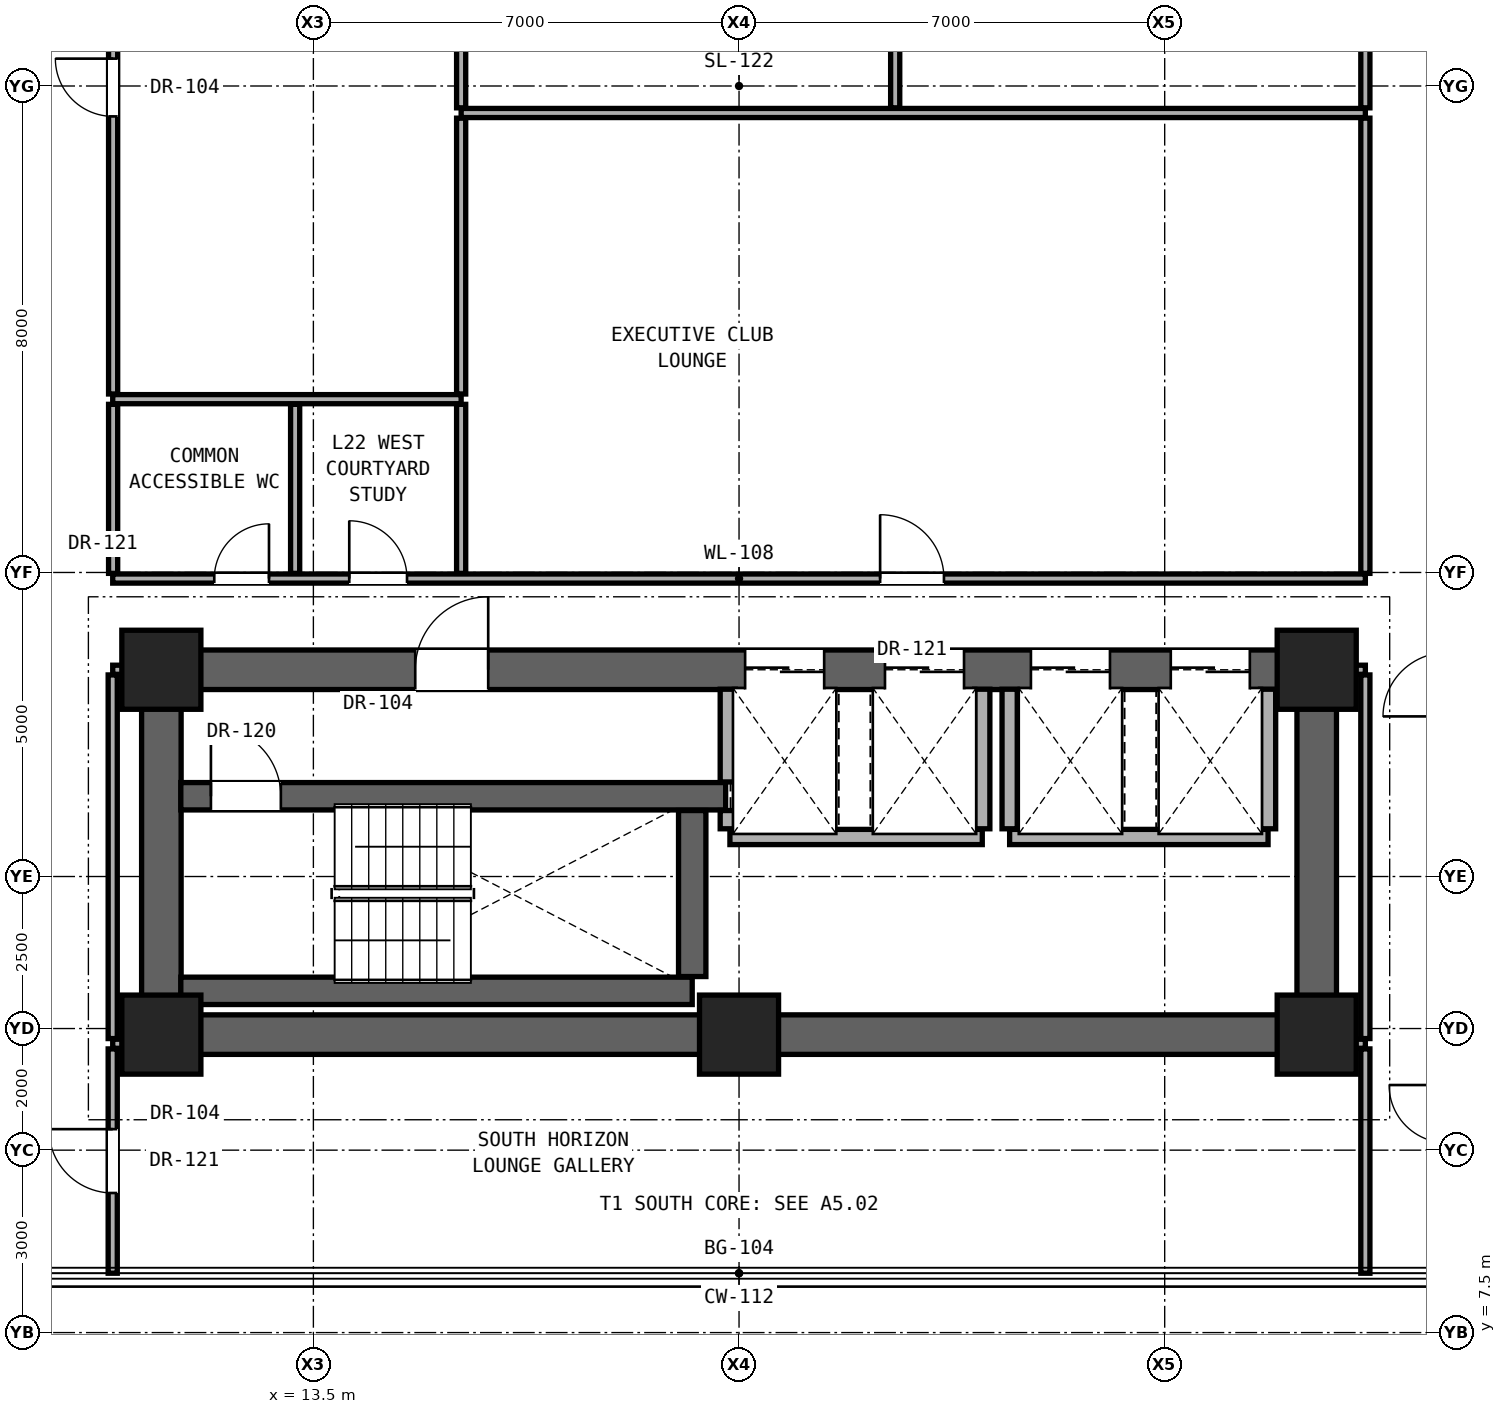
"""IFC4 building model, lengths in metres.
Left out: names, types, materials, properties, quantities, classifications, styles, units other than length and angle.
Written with IfcOpenShell. Run it as: python <this file> out.ifc"""

import sys

from ifc_helpers import new_model, si_unit, direction, frame, frame_2d, origin, origin_2d, place, context, subcontext, project, spatial, rectangle, extrude, element, fill, save


model = new_model("IFC4")
c1 = context("Model", 3, precision=1e-05, world=origin(), true_north=direction((0.0, 1.0)))
c2 = subcontext(c1, "Body", "Model", "MODEL_VIEW")
j1 = project(units=[si_unit("LENGTHUNIT", "METRE"), si_unit("PLANEANGLEUNIT", "RADIAN")], contexts=[c1])
p1 = place(None, origin())
s1 = spatial("IfcSite", under=j1, at=p1, CompositionType="ELEMENT")
p2 = place(p1, origin())
s2 = spatial("IfcBuilding", under=s1, at=p2, CompositionType="ELEMENT")
p3 = place(p2, frame((0.0, 0.0, 78.5)))
s3 = spatial("IfcBuildingStorey", under=s2, at=p3, CompositionType="ELEMENT", Elevation=78.5)
for number, where, z_axis, x_axis in (
    (1, (11.0, 12.4, 0.0), (0.0, 0.0, 1.0), (1.0, 0.0, 0.0)),
    (2, (20.5, 12.4, 0.0), (0.0, 0.0, 1.0), (1.0, 0.0, 0.0)),
    (3, (30.0, 12.4, 0.0), (0.0, 0.0, 1.0), (1.0, 0.0, 0.0)),
    (4, (11.0, 18.4, 0.0), (0.0, 0.0, 1.0), (1.0, 0.0, 0.0)),
    (5, (30.0, 18.4, 0.0), (0.0, 0.0, 1.0), (1.0, 0.0, 0.0)),
):
    element("IfcColumn", number, at=place(p3, frame(where, z_axis=z_axis, x_axis=x_axis)), inside=s3, PredefinedType="COLUMN", context=c2, shape_type="SweptSolid", body=[
        extrude(rectangle(XDim=1.3, YDim=1.3, at=origin_2d()), origin(), (0.0, 0.0, 1.0), 3.3),
    ])
p4 = place(p3, frame((11.0, 12.4, 0.0), z_axis=(0.0, 0.0, 1.0), x_axis=(1.0, 0.0, 0.0)))
e6 = element("IfcWall", 6, at=p4, inside=s3, PredefinedType="SHEAR", context=c2, shape_type="SweptSolid", body=[
    extrude(rectangle(XDim=19.0, YDim=0.65, at=frame_2d((9.5, 0.0))), origin(), (0.0, 0.0, 1.0), 2.94),
])
for number, where, z_axis, x_axis in (
    (7, (11.0, 12.4, 0.0), (0.0, 0.0, 1.0), (0.0, 1.0, 0.0)),
    (8, (30.0, 12.4, 0.0), (0.0, 0.0, 1.0), (0.0, 1.0, 0.0)),
):
    element("IfcWall", number, at=place(p3, frame(where, z_axis=z_axis, x_axis=x_axis)), inside=s3, PredefinedType="SHEAR", context=c2, shape_type="SweptSolid", body=[
        extrude(rectangle(XDim=6.0, YDim=0.65, at=frame_2d((3.0, 0.0))), origin(), (0.0, 0.0, 1.0), 2.94),
    ])
p5 = place(p3, frame((11.0, 18.4, 0.0), z_axis=(0.0, 0.0, 1.0), x_axis=(1.0, 0.0, 0.0)))
e9 = element("IfcWall", 9, at=p5, inside=s3, PredefinedType="SHEAR", context=c2, shape_type="SweptSolid", body=[
    extrude(rectangle(XDim=19.0, YDim=0.65, at=frame_2d((9.5, 0.0))), origin(), (0.0, 0.0, 1.0), 2.94),
])
p6 = place(p5, frame((4.175, 0.0, 0.0)))
e10 = element("IfcOpeningElement", 10, at=p6, cuts=e9, PredefinedType="OPENING", context=c2, shape_type="SweptSolid", body=[
    extrude(rectangle(XDim=1.2, YDim=2.25, at=frame_2d((0.6, 1.125))), frame((0.0, 0.335, 0.0), z_axis=(0.0, -1.0, 0.0), x_axis=(1.0, 0.0, 0.0)), (0.0, 0.0, 1.0), 0.67),
])
p7 = place(p5, frame((9.6, 0.0, 0.0)))
e11 = element("IfcOpeningElement", 11, at=p7, cuts=e9, PredefinedType="OPENING", context=c2, shape_type="SweptSolid", body=[
    extrude(rectangle(XDim=1.3, YDim=2.3, at=frame_2d((0.65, 1.15))), frame((0.0, 0.335, 0.0), z_axis=(0.0, -1.0, 0.0), x_axis=(1.0, 0.0, 0.0)), (0.0, 0.0, 1.0), 0.67),
])
p8 = place(p5, frame((11.9, 0.0, 0.0)))
e12 = element("IfcOpeningElement", 12, at=p8, cuts=e9, PredefinedType="OPENING", context=c2, shape_type="SweptSolid", body=[
    extrude(rectangle(XDim=1.3, YDim=2.3, at=frame_2d((0.65, 1.15))), frame((0.0, 0.335, 0.0), z_axis=(0.0, -1.0, 0.0), x_axis=(1.0, 0.0, 0.0)), (0.0, 0.0, 1.0), 0.67),
])
p9 = place(p5, frame((14.3, 0.0, 0.0)))
e13 = element("IfcOpeningElement", 13, at=p9, cuts=e9, PredefinedType="OPENING", context=c2, shape_type="SweptSolid", body=[
    extrude(rectangle(XDim=1.3, YDim=2.3, at=frame_2d((0.65, 1.15))), frame((0.0, 0.335, 0.0), z_axis=(0.0, -1.0, 0.0), x_axis=(1.0, 0.0, 0.0)), (0.0, 0.0, 1.0), 0.67),
])
p10 = place(p5, frame((16.6, 0.0, 0.0)))
e14 = element("IfcOpeningElement", 14, at=p10, cuts=e9, PredefinedType="OPENING", context=c2, shape_type="SweptSolid", body=[
    extrude(rectangle(XDim=1.3, YDim=2.3, at=frame_2d((0.65, 1.15))), frame((0.0, 0.335, 0.0), z_axis=(0.0, -1.0, 0.0), x_axis=(1.0, 0.0, 0.0)), (0.0, 0.0, 1.0), 0.67),
])
for number, where, z_axis, x_axis in (
    (15, (10.2, 12.25, 0.0), (0.0, 0.0, 1.0), (1.0, 0.0, 0.0)),
    (16, (30.32, 12.25, 0.0), (0.0, 0.0, 1.0), (1.0, 0.0, 0.0)),
):
    element("IfcWall", number, at=place(p3, frame(where, z_axis=z_axis, x_axis=x_axis)), inside=s3, PredefinedType="PARTITIONING", context=c2, shape_type="SweptSolid", body=[
        extrude(rectangle(XDim=0.48, YDim=0.15, at=frame_2d((0.24, 0.0))), origin(), (0.0, 0.0, 1.0), 2.94),
    ])
p11 = place(p3, frame((11.32, 13.12, 0.0), z_axis=(0.0, 0.0, 1.0), x_axis=(1.0, 0.0, 0.0)))
e17 = element("IfcWall", 17, at=p11, inside=s3, PredefinedType="SHEAR", context=c2, shape_type="SweptSolid", body=[
    extrude(rectangle(XDim=8.41, YDim=0.45, at=frame_2d((4.205, 0.0))), origin(), (0.0, 0.0, 1.0), 2.94),
])
p12 = place(p3, frame((20.35, 15.65, 0.0), z_axis=(0.0, 0.0, 1.0), x_axis=(1.0, 0.0, 0.0)))
e18 = element("IfcWall", 18, at=p12, inside=s3, PredefinedType="SOLIDWALL", context=c2, shape_type="SweptSolid", body=[
    extrude(rectangle(XDim=4.15, YDim=0.25, at=frame_2d((2.075, 0.0))), origin(), (0.0, 0.0, 1.0), 2.94),
])
p13 = place(p3, frame((24.95, 15.65, 0.0), z_axis=(0.0, 0.0, 1.0), x_axis=(1.0, 0.0, 0.0)))
e19 = element("IfcWall", 19, at=p13, inside=s3, PredefinedType="SOLIDWALL", context=c2, shape_type="SweptSolid", body=[
    extrude(rectangle(XDim=4.25, YDim=0.25, at=frame_2d((2.125, 0.0))), origin(), (0.0, 0.0, 1.0), 2.94),
])
p14 = place(p3, frame((11.32, 16.32, 0.0), z_axis=(0.0, 0.0, 1.0), x_axis=(1.0, 0.0, 0.0)))
e20 = element("IfcWall", 20, at=p14, inside=s3, PredefinedType="SHEAR", context=c2, shape_type="SweptSolid", body=[
    extrude(rectangle(XDim=8.96, YDim=0.45, at=frame_2d((4.48, 0.0))), origin(), (0.0, 0.0, 1.0), 2.94),
])
p15 = place(p14, frame((0.495, 0.0, 0.0)))
e21 = element("IfcOpeningElement", 21, at=p15, cuts=e20, PredefinedType="OPENING", context=c2, shape_type="SweptSolid", body=[
    extrude(rectangle(XDim=1.15, YDim=2.2, at=frame_2d((0.575, 1.1))), frame((0.0, 0.235, 0.0), z_axis=(0.0, -1.0, 0.0), x_axis=(1.0, 0.0, 0.0)), (0.0, 0.0, 1.0), 0.47),
])
for number, where, z_axis, x_axis in (
    (22, (10.2, 18.4, 0.0), (0.0, 0.0, 1.0), (1.0, 0.0, 0.0)),
    (23, (30.32, 18.4, 0.0), (0.0, 0.0, 1.0), (1.0, 0.0, 0.0)),
):
    element("IfcWall", number, at=place(p3, frame(where, z_axis=z_axis, x_axis=x_axis)), inside=s3, PredefinedType="PARTITIONING", context=c2, shape_type="SweptSolid", body=[
        extrude(rectangle(XDim=0.48, YDim=0.15, at=frame_2d((0.24, 0.0))), origin(), (0.0, 0.0, 1.0), 2.316),
    ])
p16 = place(p3, frame((10.2, 19.9, 0.0), z_axis=(0.0, 0.0, 1.0), x_axis=(1.0, 0.0, 0.0)))
e24 = element("IfcWall", 24, at=p16, inside=s3, PredefinedType="PARTITIONING", context=c2, shape_type="SweptSolid", body=[
    extrude(rectangle(XDim=20.6, YDim=0.15, at=frame_2d((10.3, 0.0))), origin(), (0.0, 0.0, 1.0), 2.316),
])
p17 = place(p16, frame((1.67, 0.0, 0.0)))
e25 = element("IfcOpeningElement", 25, at=p17, cuts=e24, PredefinedType="OPENING", context=c2, shape_type="SweptSolid", body=[
    extrude(rectangle(XDim=0.9, YDim=2.1, at=frame_2d((0.45, 1.05))), frame((0.0, 0.085, 0.0), z_axis=(0.0, -1.0, 0.0), x_axis=(1.0, 0.0, 0.0)), (0.0, 0.0, 1.0), 0.17),
])
p18 = place(p16, frame((3.89, 0.0, 0.0)))
e26 = element("IfcOpeningElement", 26, at=p18, cuts=e24, PredefinedType="OPENING", context=c2, shape_type="SweptSolid", body=[
    extrude(rectangle(XDim=0.95, YDim=2.15, at=frame_2d((0.475, 1.075))), frame((0.0, 0.085, 0.0), z_axis=(0.0, -1.0, 0.0), x_axis=(1.0, 0.0, 0.0)), (0.0, 0.0, 1.0), 0.17),
])
p19 = place(p16, frame((12.62, 0.0, 0.0)))
e27 = element("IfcOpeningElement", 27, at=p19, cuts=e24, PredefinedType="OPENING", context=c2, shape_type="SweptSolid", body=[
    extrude(rectangle(XDim=1.05, YDim=2.2, at=frame_2d((0.525, 1.1))), frame((0.0, 0.085, 0.0), z_axis=(0.0, -1.0, 0.0), x_axis=(1.0, 0.0, 0.0)), (0.0, 0.0, 1.0), 0.17),
])
p20 = place(p3, frame((10.2, 22.85, 0.0), z_axis=(0.0, 0.0, 1.0), x_axis=(1.0, 0.0, 0.0)))
e28 = element("IfcWall", 28, at=p20, inside=s3, PredefinedType="PARTITIONING", context=c2, shape_type="SweptSolid", body=[
    extrude(rectangle(XDim=5.73, YDim=0.15, at=frame_2d((2.865, 0.0))), origin(), (0.0, 0.0, 1.0), 2.316),
])
p21 = place(p3, frame((15.93, 27.556, 0.0), z_axis=(0.0, 0.0, 1.0), x_axis=(1.0, 0.0, 0.0)))
e29 = element("IfcWall", 29, at=p21, inside=s3, PredefinedType="PARTITIONING", context=c2, shape_type="SweptSolid", body=[
    extrude(rectangle(XDim=14.87, YDim=0.15, at=frame_2d((7.435, 0.0))), origin(), (0.0, 0.0, 1.0), 2.316),
])
p22 = place(p3, frame((10.2, 8.476, 0.0), z_axis=(0.0, 0.0, 1.0), x_axis=(0.0, 1.0, 0.0)))
e30 = element("IfcWall", 30, at=p22, inside=s3, PredefinedType="PARTITIONING", context=c2, shape_type="SweptSolid", body=[
    extrude(rectangle(XDim=3.689, YDim=0.15, at=frame_2d((1.844, 0.0))), origin(), (0.0, 0.0, 1.0), 2.94),
])
p23 = place(p22, frame((1.32, 0.0, 0.0)))
e31 = element("IfcOpeningElement", 31, at=p23, cuts=e30, PredefinedType="OPENING", context=c2, shape_type="SweptSolid", body=[
    extrude(rectangle(XDim=1.05, YDim=2.2, at=frame_2d((0.525, 1.1))), frame((0.0, 0.085, 0.0), z_axis=(0.0, -1.0, 0.0), x_axis=(1.0, 0.0, 0.0)), (0.0, 0.0, 1.0), 0.17),
])
p24 = place(p3, frame((10.2, 12.335, 0.0), z_axis=(0.0, 0.0, 1.0), x_axis=(0.0, 1.0, 0.0)))
e32 = element("IfcWall", 32, at=p24, inside=s3, PredefinedType="PARTITIONING", context=c2, shape_type="SweptSolid", body=[
    extrude(rectangle(XDim=5.98, YDim=0.15, at=frame_2d((2.99, 0.0))), origin(), (0.0, 0.0, 1.0), 2.316),
])
p25 = place(p3, frame((10.207, 19.985, 0.0), z_axis=(0.0, 0.0, 1.0), x_axis=(0.0, 1.0, 0.0)))
e33 = element("IfcWall", 33, at=p25, inside=s3, PredefinedType="PARTITIONING", context=c2, shape_type="SweptSolid", body=[
    extrude(rectangle(XDim=2.78, YDim=0.15, at=frame_2d((1.39, 0.0))), origin(), (0.0, 0.0, 1.0), 2.94),
])
p26 = place(p3, frame((10.207, 22.935, 0.0), z_axis=(0.0, 0.0, 1.0), x_axis=(0.0, 1.0, 0.0)))
e34 = element("IfcWall", 34, at=p26, inside=s3, PredefinedType="PARTITIONING", context=c2, shape_type="SweptSolid", body=[
    extrude(rectangle(XDim=10.08, YDim=0.15, at=frame_2d((5.04, 0.0))), origin(), (0.0, 0.0, 1.0), 2.316),
])
p27 = place(p26, frame((4.565, 0.0, 0.0)))
e35 = element("IfcOpeningElement", 35, at=p27, cuts=e34, PredefinedType="OPENING", context=c2, shape_type="SweptSolid", body=[
    extrude(rectangle(XDim=0.95, YDim=2.15, at=frame_2d((0.475, 1.075))), frame((0.0, 0.085, 0.0), z_axis=(0.0, -1.0, 0.0), x_axis=(1.0, 0.0, 0.0)), (0.0, 0.0, 1.0), 0.17),
])
p28 = place(p3, frame((13.2, 19.985, 0.0), z_axis=(0.0, 0.0, 1.0), x_axis=(0.0, 1.0, 0.0)))
e36 = element("IfcWall", 36, at=p28, inside=s3, PredefinedType="PARTITIONING", context=c2, shape_type="SweptSolid", body=[
    extrude(rectangle(XDim=2.78, YDim=0.15, at=frame_2d((1.39, 0.0))), origin(), (0.0, 0.0, 1.0), 2.94),
])
p29 = place(p3, frame((15.93, 19.985, 0.0), z_axis=(0.0, 0.0, 1.0), x_axis=(0.0, 1.0, 0.0)))
e37 = element("IfcWall", 37, at=p29, inside=s3, PredefinedType="PARTITIONING", context=c2, shape_type="SweptSolid", body=[
    extrude(rectangle(XDim=2.78, YDim=0.15, at=frame_2d((1.39, 0.0))), origin(), (0.0, 0.0, 1.0), 2.469),
])
p30 = place(p3, frame((15.93, 22.935, 0.0), z_axis=(0.0, 0.0, 1.0), x_axis=(0.0, 1.0, 0.0)))
e38 = element("IfcWall", 38, at=p30, inside=s3, PredefinedType="PARTITIONING", context=c2, shape_type="SweptSolid", body=[
    extrude(rectangle(XDim=4.536, YDim=0.15, at=frame_2d((2.268, 0.0))), origin(), (0.0, 0.0, 1.0), 2.316),
])
p31 = place(p3, frame((15.93, 27.641, 0.0), z_axis=(0.0, 0.0, 1.0), x_axis=(0.0, 1.0, 0.0)))
e39 = element("IfcWall", 39, at=p31, inside=s3, PredefinedType="PARTITIONING", context=c2, shape_type="SweptSolid", body=[
    extrude(rectangle(XDim=5.374, YDim=0.15, at=frame_2d((2.687, 0.0))), origin(), (0.0, 0.0, 1.0), 2.316),
])
p32 = place(p3, frame((19.73, 13.355, 0.0), z_axis=(0.0, 0.0, 1.0), x_axis=(0.0, 1.0, 0.0)))
e40 = element("IfcWall", 40, at=p32, inside=s3, PredefinedType="SHEAR", context=c2, shape_type="SweptSolid", body=[
    extrude(rectangle(XDim=2.73, YDim=0.45, at=frame_2d((1.365, 0.0))), origin(), (0.0, 0.0, 1.0), 2.94),
])
p33 = place(p3, frame((20.315, 15.785, 0.0), z_axis=(0.0, 0.0, 1.0), x_axis=(0.0, 1.0, 0.0)))
e41 = element("IfcWall", 41, at=p33, inside=s3, PredefinedType="SOLIDWALL", context=c2, shape_type="SweptSolid", body=[
    extrude(rectangle(XDim=0.3, YDim=0.25, at=frame_2d((0.15, 0.0))), origin(), (0.0, 0.0, 1.0), 2.94),
])
p34 = place(p3, frame((20.315, 16.555, 0.0), z_axis=(0.0, 0.0, 1.0), x_axis=(0.0, 1.0, 0.0)))
e42 = element("IfcWall", 42, at=p34, inside=s3, PredefinedType="SOLIDWALL", context=c2, shape_type="SweptSolid", body=[
    extrude(rectangle(XDim=1.525, YDim=0.25, at=frame_2d((0.763, 0.0))), origin(), (0.0, 0.0, 1.0), 2.94),
])
p35 = place(p3, frame((23.068, 27.641, 0.0), z_axis=(0.0, 0.0, 1.0), x_axis=(0.0, 1.0, 0.0)))
e43 = element("IfcWall", 43, at=p35, inside=s3, PredefinedType="PARTITIONING", context=c2, shape_type="SweptSolid", body=[
    extrude(rectangle(XDim=5.374, YDim=0.15, at=frame_2d((2.687, 0.0))), origin(), (0.0, 0.0, 1.0), 2.316),
])
for number, where, z_axis, x_axis in (
    (44, (24.5, 15.785, 0.0), (0.0, 0.0, 1.0), (0.0, 1.0, 0.0)),
    (45, (24.95, 15.785, 0.0), (0.0, 0.0, 1.0), (0.0, 1.0, 0.0)),
    (46, (29.2, 15.785, 0.0), (0.0, 0.0, 1.0), (0.0, 1.0, 0.0)),
):
    element("IfcWall", number, at=place(p3, frame(where, z_axis=z_axis, x_axis=x_axis)), inside=s3, PredefinedType="SOLIDWALL", context=c2, shape_type="SweptSolid", body=[
        extrude(rectangle(XDim=2.295, YDim=0.25, at=frame_2d((1.147, 0.0))), origin(), (0.0, 0.0, 1.0), 2.94),
    ])
p36 = place(p3, frame((30.8, 8.476, 0.0), z_axis=(0.0, 0.0, 1.0), x_axis=(0.0, 1.0, 0.0)))
e47 = element("IfcWall", 47, at=p36, inside=s3, PredefinedType="PARTITIONING", context=c2, shape_type="SweptSolid", body=[
    extrude(rectangle(XDim=3.689, YDim=0.15, at=frame_2d((1.844, 0.0))), origin(), (0.0, 0.0, 1.0), 2.94),
])
p37 = place(p3, frame((30.8, 12.335, 0.0), z_axis=(0.0, 0.0, 1.0), x_axis=(0.0, 1.0, 0.0)))
e48 = element("IfcWall", 48, at=p37, inside=s3, PredefinedType="PARTITIONING", context=c2, shape_type="SweptSolid", body=[
    extrude(rectangle(XDim=5.98, YDim=0.15, at=frame_2d((2.99, 0.0))), origin(), (0.0, 0.0, 1.0), 2.316),
])
p38 = place(p3, frame((30.8, 19.985, 0.0), z_axis=(0.0, 0.0, 1.0), x_axis=(0.0, 1.0, 0.0)))
e49 = element("IfcWall", 49, at=p38, inside=s3, PredefinedType="PARTITIONING", context=c2, shape_type="SweptSolid", body=[
    extrude(rectangle(XDim=7.486, YDim=0.15, at=frame_2d((3.743, 0.0))), origin(), (0.0, 0.0, 1.0), 2.316),
])
p39 = place(p3, frame((30.8, 27.641, 0.0), z_axis=(0.0, 0.0, 1.0), x_axis=(0.0, 1.0, 0.0)))
e50 = element("IfcWall", 50, at=p39, inside=s3, PredefinedType="PARTITIONING", context=c2, shape_type="SweptSolid", body=[
    extrude(rectangle(XDim=5.374, YDim=0.15, at=frame_2d((2.687, 0.0))), origin(), (0.0, 0.0, 1.0), 2.316),
])
p40 = place(p6, origin())
e51 = element("IfcDoor", 51, at=p40, inside=s3, OperationType="SINGLE_SWING_RIGHT", PredefinedType="DOOR", context=c2, shape_type="SweptSolid", body=[
    extrude(rectangle(XDim=1.2, YDim=2.25, at=frame_2d((0.6, 1.125))), frame((0.0, 0.025, 0.0), z_axis=(0.0, -1.0, 0.0), x_axis=(1.0, 0.0, 0.0)), (0.0, 0.0, 1.0), 0.05),
])
fill(e10, e51)
p41 = place(p15, origin())
e52 = element("IfcDoor", 52, at=p41, inside=s3, OperationType="SINGLE_SWING_LEFT", PredefinedType="DOOR", context=c2, shape_type="SweptSolid", body=[
    extrude(rectangle(XDim=1.15, YDim=2.2, at=frame_2d((0.575, 1.1))), frame((0.0, 0.025, 0.0), z_axis=(0.0, -1.0, 0.0), x_axis=(1.0, 0.0, 0.0)), (0.0, 0.0, 1.0), 0.05),
])
fill(e21, e52)
p42 = place(p17, origin())
e53 = element("IfcDoor", 53, at=p42, inside=s3, OperationType="SINGLE_SWING_RIGHT", PredefinedType="DOOR", context=c2, shape_type="SweptSolid", body=[
    extrude(rectangle(XDim=0.9, YDim=2.1, at=frame_2d((0.45, 1.05))), frame((0.0, 0.025, 0.0), z_axis=(0.0, -1.0, 0.0), x_axis=(1.0, 0.0, 0.0)), (0.0, 0.0, 1.0), 0.05),
])
fill(e25, e53)
p43 = place(p18, origin())
e54 = element("IfcDoor", 54, at=p43, inside=s3, OperationType="SINGLE_SWING_LEFT", PredefinedType="DOOR", context=c2, shape_type="SweptSolid", body=[
    extrude(rectangle(XDim=0.95, YDim=2.15, at=frame_2d((0.475, 1.075))), frame((0.0, 0.025, 0.0), z_axis=(0.0, -1.0, 0.0), x_axis=(1.0, 0.0, 0.0)), (0.0, 0.0, 1.0), 0.05),
])
fill(e26, e54)
p44 = place(p27, origin())
e55 = element("IfcDoor", 55, at=p44, inside=s3, OperationType="SINGLE_SWING_RIGHT", PredefinedType="DOOR", context=c2, shape_type="SweptSolid", body=[
    extrude(rectangle(XDim=0.95, YDim=2.15, at=frame_2d((0.475, 1.075))), frame((0.0, 0.025, 0.0), z_axis=(0.0, -1.0, 0.0), x_axis=(1.0, 0.0, 0.0)), (0.0, 0.0, 1.0), 0.05),
])
fill(e35, e55)
p45 = place(p19, origin())
e56 = element("IfcDoor", 56, at=p45, inside=s3, OperationType="SINGLE_SWING_LEFT", PredefinedType="DOOR", context=c2, shape_type="SweptSolid", body=[
    extrude(rectangle(XDim=1.05, YDim=2.2, at=frame_2d((0.525, 1.1))), frame((0.0, 0.025, 0.0), z_axis=(0.0, -1.0, 0.0), x_axis=(1.0, 0.0, 0.0)), (0.0, 0.0, 1.0), 0.05),
])
fill(e27, e56)
p46 = place(p23, origin())
e57 = element("IfcDoor", 57, at=p46, inside=s3, OperationType="SINGLE_SWING_RIGHT", PredefinedType="DOOR", context=c2, shape_type="SweptSolid", body=[
    extrude(rectangle(XDim=1.05, YDim=2.2, at=frame_2d((0.525, 1.1))), frame((0.0, 0.025, 0.0), z_axis=(0.0, -1.0, 0.0), x_axis=(1.0, 0.0, 0.0)), (0.0, 0.0, 1.0), 0.05),
])
fill(e31, e57)
p47 = place(p7, origin())
e58 = element("IfcDoor", 58, at=p47, inside=s3, OperationType="DOUBLE_DOOR_SLIDING", PredefinedType="DOOR", context=c2, shape_type="SweptSolid", body=[
    extrude(rectangle(XDim=1.3, YDim=2.3, at=frame_2d((0.65, 1.15))), frame((0.0, 0.025, 0.0), z_axis=(0.0, -1.0, 0.0), x_axis=(1.0, 0.0, 0.0)), (0.0, 0.0, 1.0), 0.05),
])
fill(e11, e58)
p48 = place(p8, origin())
e59 = element("IfcDoor", 59, at=p48, inside=s3, OperationType="DOUBLE_DOOR_SLIDING", PredefinedType="DOOR", context=c2, shape_type="SweptSolid", body=[
    extrude(rectangle(XDim=1.3, YDim=2.3, at=frame_2d((0.65, 1.15))), frame((0.0, 0.025, 0.0), z_axis=(0.0, -1.0, 0.0), x_axis=(1.0, 0.0, 0.0)), (0.0, 0.0, 1.0), 0.05),
])
fill(e12, e59)
p49 = place(p9, origin())
e60 = element("IfcDoor", 60, at=p49, inside=s3, OperationType="DOUBLE_DOOR_SLIDING", PredefinedType="DOOR", context=c2, shape_type="SweptSolid", body=[
    extrude(rectangle(XDim=1.3, YDim=2.3, at=frame_2d((0.65, 1.15))), frame((0.0, 0.025, 0.0), z_axis=(0.0, -1.0, 0.0), x_axis=(1.0, 0.0, 0.0)), (0.0, 0.0, 1.0), 0.05),
])
fill(e13, e60)
p50 = place(p10, origin())
e61 = element("IfcDoor", 61, at=p50, inside=s3, OperationType="DOUBLE_DOOR_SLIDING", PredefinedType="DOOR", context=c2, shape_type="SweptSolid", body=[
    extrude(rectangle(XDim=1.3, YDim=2.3, at=frame_2d((0.65, 1.15))), frame((0.0, 0.025, 0.0), z_axis=(0.0, -1.0, 0.0), x_axis=(1.0, 0.0, 0.0)), (0.0, 0.0, 1.0), 0.05),
])
fill(e14, e61)
save(model, sys.argv[1])
